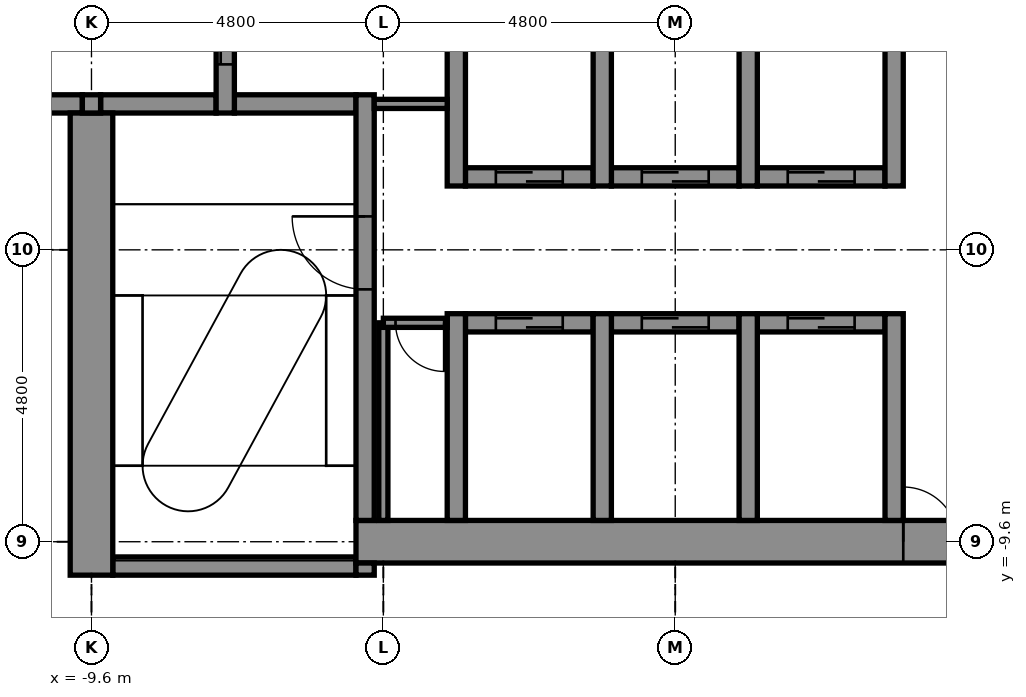
"""IFC4 building model, lengths in metres.
Left out: names, types, materials, properties, quantities, classifications, styles, units other than length and angle.
Written with IfcOpenShell. Run it as: python <this file> out.ifc"""

import sys

from ifc_helpers import new_model, si_unit, direction, frame, frame_2d, origin, place, context, subcontext, project, spatial, rectangle, extrude, element, fill, save


model = new_model("IFC4")
c1 = context("Model", 3, precision=1e-05, world=origin(), true_north=direction((0.0, 1.0)))
c2 = subcontext(c1, "Body", "Model", "MODEL_VIEW")
j1 = project(units=[si_unit("LENGTHUNIT", "METRE"), si_unit("PLANEANGLEUNIT", "RADIAN")], contexts=[c1])
p1 = place(None, origin())
s1 = spatial("IfcSite", under=j1, at=p1, CompositionType="ELEMENT")
p2 = place(p1, origin())
s2 = spatial("IfcBuilding", under=s1, at=p2, CompositionType="ELEMENT")
p3 = place(p2, frame((0.0, 0.0, 181.7)))
s3 = spatial("IfcBuildingStorey", under=s2, at=p3, CompositionType="ELEMENT", Elevation=181.7)
p4 = place(p3, frame((-9.25, -10.0, -0.15), z_axis=(0.0, 0.0, 1.0), x_axis=(1.0, 0.0, 0.0)))
e1 = element("IfcWall", 1, at=p4, inside=s3, PredefinedType="STANDARD", context=c2, shape_type="SweptSolid", body=[
    extrude(rectangle(XDim=4.0, YDim=0.3, at=frame_2d((2.0, 0.0))), origin(), (0.0, 0.0, 1.0), 3.9),
])
p5 = place(p3, frame((-5.25, -9.6, -0.15), z_axis=(0.0, 0.0, 1.0), x_axis=(1.0, 0.0, 0.0)))
e2 = element("IfcWall", 2, at=p5, inside=s3, PredefinedType="SHEAR", context=c2, shape_type="SweptSolid", body=[
    extrude(rectangle(XDim=10.2, YDim=0.7, at=frame_2d((5.1, 0.0))), origin(), (0.0, 0.0, 1.0), 3.9),
])
p6 = place(p5, frame((9.0, 0.0, 0.15)))
e3 = element("IfcOpeningElement", 3, at=p6, cuts=e2, PredefinedType="OPENING", context=c2, shape_type="SweptSolid", body=[
    extrude(rectangle(XDim=0.9, YDim=2.1, at=frame_2d((0.45, 1.05))), frame((0.0, 0.36, 0.0), z_axis=(0.0, -1.0, 0.0), x_axis=(1.0, 0.0, 0.0)), (0.0, 0.0, 1.0), 0.72),
])
p7 = place(p3, frame((-3.45, -6.0, -0.15), z_axis=(0.0, 0.0, 1.0), x_axis=(1.0, 0.0, 0.0)))
e4 = element("IfcWall", 4, at=p7, inside=s3, PredefinedType="STANDARD", context=c2, shape_type="SweptSolid", body=[
    extrude(rectangle(XDim=2.1, YDim=0.3, at=frame_2d((1.05, 0.0))), origin(), (0.0, 0.0, 1.0), 3.9),
])
p8 = place(p7, frame((0.5, 0.0, 0.15)))
e5 = element("IfcOpeningElement", 5, at=p8, cuts=e4, PredefinedType="OPENING", context=c2, shape_type="SweptSolid", body=[
    extrude(rectangle(XDim=1.1, YDim=2.1, at=frame_2d((0.55, 1.05))), frame((0.0, 0.16, 0.0), z_axis=(0.0, -1.0, 0.0), x_axis=(1.0, 0.0, 0.0)), (0.0, 0.0, 1.0), 0.32),
])
p9 = place(p3, frame((-1.05, -6.0, -0.15), z_axis=(0.0, 0.0, 1.0), x_axis=(1.0, 0.0, 0.0)))
e6 = element("IfcWall", 6, at=p9, inside=s3, PredefinedType="STANDARD", context=c2, shape_type="SweptSolid", body=[
    extrude(rectangle(XDim=2.1, YDim=0.3, at=frame_2d((1.05, 0.0))), origin(), (0.0, 0.0, 1.0), 3.9),
])
p10 = place(p9, frame((0.5, 0.0, 0.15)))
e7 = element("IfcOpeningElement", 7, at=p10, cuts=e6, PredefinedType="OPENING", context=c2, shape_type="SweptSolid", body=[
    extrude(rectangle(XDim=1.1, YDim=2.1, at=frame_2d((0.55, 1.05))), frame((0.0, 0.16, 0.0), z_axis=(0.0, -1.0, 0.0), x_axis=(1.0, 0.0, 0.0)), (0.0, 0.0, 1.0), 0.32),
])
p11 = place(p3, frame((1.35, -6.0, -0.15), z_axis=(0.0, 0.0, 1.0), x_axis=(1.0, 0.0, 0.0)))
e8 = element("IfcWall", 8, at=p11, inside=s3, PredefinedType="STANDARD", context=c2, shape_type="SweptSolid", body=[
    extrude(rectangle(XDim=2.1, YDim=0.3, at=frame_2d((1.05, 0.0))), origin(), (0.0, 0.0, 1.0), 3.9),
])
p12 = place(p11, frame((0.5, 0.0, 0.15)))
e9 = element("IfcOpeningElement", 9, at=p12, cuts=e8, PredefinedType="OPENING", context=c2, shape_type="SweptSolid", body=[
    extrude(rectangle(XDim=1.1, YDim=2.1, at=frame_2d((0.55, 1.05))), frame((0.0, 0.16, 0.0), z_axis=(0.0, -1.0, 0.0), x_axis=(1.0, 0.0, 0.0)), (0.0, 0.0, 1.0), 0.32),
])
p13 = place(p3, frame((-3.45, -3.6, -0.15), z_axis=(0.0, 0.0, 1.0), x_axis=(1.0, 0.0, 0.0)))
e10 = element("IfcWall", 10, at=p13, inside=s3, PredefinedType="STANDARD", context=c2, shape_type="SweptSolid", body=[
    extrude(rectangle(XDim=2.1, YDim=0.3, at=frame_2d((1.05, 0.0))), origin(), (0.0, 0.0, 1.0), 3.9),
])
p14 = place(p13, frame((0.5, 0.0, 0.15)))
e11 = element("IfcOpeningElement", 11, at=p14, cuts=e10, PredefinedType="OPENING", context=c2, shape_type="SweptSolid", body=[
    extrude(rectangle(XDim=1.1, YDim=2.1, at=frame_2d((0.55, 1.05))), frame((0.0, 0.16, 0.0), z_axis=(0.0, -1.0, 0.0), x_axis=(1.0, 0.0, 0.0)), (0.0, 0.0, 1.0), 0.32),
])
p15 = place(p3, frame((-1.05, -3.6, -0.15), z_axis=(0.0, 0.0, 1.0), x_axis=(1.0, 0.0, 0.0)))
e12 = element("IfcWall", 12, at=p15, inside=s3, PredefinedType="STANDARD", context=c2, shape_type="SweptSolid", body=[
    extrude(rectangle(XDim=2.1, YDim=0.3, at=frame_2d((1.05, 0.0))), origin(), (0.0, 0.0, 1.0), 3.9),
])
p16 = place(p15, frame((0.5, 0.0, 0.15)))
e13 = element("IfcOpeningElement", 13, at=p16, cuts=e12, PredefinedType="OPENING", context=c2, shape_type="SweptSolid", body=[
    extrude(rectangle(XDim=1.1, YDim=2.1, at=frame_2d((0.55, 1.05))), frame((0.0, 0.16, 0.0), z_axis=(0.0, -1.0, 0.0), x_axis=(1.0, 0.0, 0.0)), (0.0, 0.0, 1.0), 0.32),
])
p17 = place(p3, frame((1.35, -3.6, -0.15), z_axis=(0.0, 0.0, 1.0), x_axis=(1.0, 0.0, 0.0)))
e14 = element("IfcWall", 14, at=p17, inside=s3, PredefinedType="STANDARD", context=c2, shape_type="SweptSolid", body=[
    extrude(rectangle(XDim=2.1, YDim=0.3, at=frame_2d((1.05, 0.0))), origin(), (0.0, 0.0, 1.0), 3.9),
])
p18 = place(p17, frame((0.5, 0.0, 0.15)))
e15 = element("IfcOpeningElement", 15, at=p18, cuts=e14, PredefinedType="OPENING", context=c2, shape_type="SweptSolid", body=[
    extrude(rectangle(XDim=1.1, YDim=2.1, at=frame_2d((0.55, 1.05))), frame((0.0, 0.16, 0.0), z_axis=(0.0, -1.0, 0.0), x_axis=(1.0, 0.0, 0.0)), (0.0, 0.0, 1.0), 0.32),
])
p19 = place(p3, frame((-10.85, -2.4, -0.15), z_axis=(0.0, 0.0, 1.0), x_axis=(1.0, 0.0, 0.0)))
e16 = element("IfcWall", 16, at=p19, inside=s3, PredefinedType="STANDARD", context=c2, shape_type="SweptSolid", body=[
    extrude(rectangle(XDim=1.1, YDim=0.3, at=frame_2d((0.55, 0.0))), origin(), (0.0, 0.0, 1.0), 3.9),
])
p20 = place(p3, frame((-9.45, -2.4, -0.15), z_axis=(0.0, 0.0, 1.0), x_axis=(1.0, 0.0, 0.0)))
e17 = element("IfcWall", 17, at=p20, inside=s3, PredefinedType="STANDARD", context=c2, shape_type="SweptSolid", body=[
    extrude(rectangle(XDim=1.9, YDim=0.3, at=frame_2d((0.95, 0.0))), origin(), (0.0, 0.0, 1.0), 3.9),
])
p21 = place(p3, frame((-7.25, -2.4, -0.15), z_axis=(0.0, 0.0, 1.0), x_axis=(1.0, 0.0, 0.0)))
e18 = element("IfcWall", 18, at=p21, inside=s3, PredefinedType="STANDARD", context=c2, shape_type="SweptSolid", body=[
    extrude(rectangle(XDim=2.0, YDim=0.3, at=frame_2d((1.0, 0.0))), origin(), (0.0, 0.0, 1.0), 3.9),
])
p22 = place(p3, frame((-9.6, -10.15, -0.15), z_axis=(0.0, 0.0, 1.0), x_axis=(0.0, 1.0, 0.0)))
e19 = element("IfcWall", 19, at=p22, inside=s3, PredefinedType="SHEAR", context=c2, shape_type="SweptSolid", body=[
    extrude(rectangle(XDim=7.6, YDim=0.7, at=frame_2d((3.8, 0.0))), origin(), (0.0, 0.0, 1.0), 3.9),
])
p23 = place(p3, frame((-9.6, -2.55, -0.15), z_axis=(0.0, 0.0, 1.0), x_axis=(0.0, 1.0, 0.0)))
e20 = element("IfcWall", 20, at=p23, inside=s3, PredefinedType="STANDARD", context=c2, shape_type="SweptSolid", body=[
    extrude(rectangle(XDim=0.3, YDim=0.3, at=frame_2d((0.15, 0.0))), origin(), (0.0, 0.0, 1.0), 3.9),
])
p24 = place(p3, frame((-7.4, -2.55, -0.15), z_axis=(0.0, 0.0, 1.0), x_axis=(0.0, 1.0, 0.0)))
e21 = element("IfcWall", 21, at=p24, inside=s3, PredefinedType="STANDARD", context=c2, shape_type="SweptSolid", body=[
    extrude(rectangle(XDim=5.1, YDim=0.3, at=frame_2d((2.55, 0.0))), origin(), (0.0, 0.0, 1.0), 3.9),
])
p25 = place(p24, frame((0.8, 0.0, 0.15)))
e22 = element("IfcOpeningElement", 22, at=p25, cuts=e21, PredefinedType="OPENING", context=c2, shape_type="SweptSolid", body=[
    extrude(rectangle(XDim=1.1, YDim=2.1, at=frame_2d((0.55, 1.05))), frame((0.0, 0.16, 0.0), z_axis=(0.0, -1.0, 0.0), x_axis=(1.0, 0.0, 0.0)), (0.0, 0.0, 1.0), 0.32),
])
p26 = place(p24, frame((3.2, 0.0, 0.15)))
e23 = element("IfcOpeningElement", 23, at=p26, cuts=e21, PredefinedType="OPENING", context=c2, shape_type="SweptSolid", body=[
    extrude(rectangle(XDim=1.1, YDim=2.1, at=frame_2d((0.55, 1.05))), frame((0.0, 0.16, 0.0), z_axis=(0.0, -1.0, 0.0), x_axis=(1.0, 0.0, 0.0)), (0.0, 0.0, 1.0), 0.32),
])
p27 = place(p3, frame((-5.1, -10.15, -0.15), z_axis=(0.0, 0.0, 1.0), x_axis=(0.0, 1.0, 0.0)))
e24 = element("IfcWall", 24, at=p27, inside=s3, PredefinedType="STANDARD", context=c2, shape_type="SweptSolid", body=[
    extrude(rectangle(XDim=0.2, YDim=0.3, at=frame_2d((0.1, 0.0))), origin(), (0.0, 0.0, 1.0), 3.9),
])
p28 = place(p3, frame((-5.1, -9.25, -0.15), z_axis=(0.0, 0.0, 1.0), x_axis=(0.0, 1.0, 0.0)))
e25 = element("IfcWall", 25, at=p28, inside=s3, PredefinedType="STANDARD", context=c2, shape_type="SweptSolid", body=[
    extrude(rectangle(XDim=7.0, YDim=0.3, at=frame_2d((3.5, 0.0))), origin(), (0.0, 0.0, 1.0), 3.9),
])
p29 = place(p28, frame((3.8, 0.0, 0.15)))
e26 = element("IfcOpeningElement", 26, at=p29, cuts=e25, PredefinedType="OPENING", context=c2, shape_type="SweptSolid", body=[
    extrude(rectangle(XDim=1.2, YDim=2.1, at=frame_2d((0.6, 1.05))), frame((0.0, 0.16, 0.0), z_axis=(0.0, -1.0, 0.0), x_axis=(1.0, 0.0, 0.0)), (0.0, 0.0, 1.0), 0.32),
])
p30 = place(p3, frame((-3.6, -9.25, -0.15), z_axis=(0.0, 0.0, 1.0), x_axis=(0.0, 1.0, 0.0)))
e27 = element("IfcWall", 27, at=p30, inside=s3, PredefinedType="STANDARD", context=c2, shape_type="SweptSolid", body=[
    extrude(rectangle(XDim=3.4, YDim=0.3, at=frame_2d((1.7, 0.0))), origin(), (0.0, 0.0, 1.0), 3.9),
])
p31 = place(p3, frame((-3.6, -3.75, -0.15), z_axis=(0.0, 0.0, 1.0), x_axis=(0.0, 1.0, 0.0)))
e28 = element("IfcWall", 28, at=p31, inside=s3, PredefinedType="STANDARD", context=c2, shape_type="SweptSolid", body=[
    extrude(rectangle(XDim=7.5, YDim=0.3, at=frame_2d((3.75, 0.0))), origin(), (0.0, 0.0, 1.0), 3.9),
])
p32 = place(p3, frame((-1.2, -9.25, -0.15), z_axis=(0.0, 0.0, 1.0), x_axis=(0.0, 1.0, 0.0)))
e29 = element("IfcWall", 29, at=p32, inside=s3, PredefinedType="STANDARD", context=c2, shape_type="SweptSolid", body=[
    extrude(rectangle(XDim=3.4, YDim=0.3, at=frame_2d((1.7, 0.0))), origin(), (0.0, 0.0, 1.0), 3.9),
])
p33 = place(p3, frame((-1.2, -3.75, -0.15), z_axis=(0.0, 0.0, 1.0), x_axis=(0.0, 1.0, 0.0)))
e30 = element("IfcWall", 30, at=p33, inside=s3, PredefinedType="STANDARD", context=c2, shape_type="SweptSolid", body=[
    extrude(rectangle(XDim=7.5, YDim=0.3, at=frame_2d((3.75, 0.0))), origin(), (0.0, 0.0, 1.0), 3.9),
])
p34 = place(p3, frame((1.2, -9.25, -0.15), z_axis=(0.0, 0.0, 1.0), x_axis=(0.0, 1.0, 0.0)))
e31 = element("IfcWall", 31, at=p34, inside=s3, PredefinedType="STANDARD", context=c2, shape_type="SweptSolid", body=[
    extrude(rectangle(XDim=3.4, YDim=0.3, at=frame_2d((1.7, 0.0))), origin(), (0.0, 0.0, 1.0), 3.9),
])
p35 = place(p3, frame((1.2, -3.75, -0.15), z_axis=(0.0, 0.0, 1.0), x_axis=(0.0, 1.0, 0.0)))
e32 = element("IfcWall", 32, at=p35, inside=s3, PredefinedType="STANDARD", context=c2, shape_type="SweptSolid", body=[
    extrude(rectangle(XDim=7.5, YDim=0.3, at=frame_2d((3.75, 0.0))), origin(), (0.0, 0.0, 1.0), 3.9),
])
p36 = place(p3, frame((3.6, -9.25, -0.15), z_axis=(0.0, 0.0, 1.0), x_axis=(0.0, 1.0, 0.0)))
e33 = element("IfcWall", 33, at=p36, inside=s3, PredefinedType="STANDARD", context=c2, shape_type="SweptSolid", body=[
    extrude(rectangle(XDim=3.4, YDim=0.3, at=frame_2d((1.7, 0.0))), origin(), (0.0, 0.0, 1.0), 3.9),
])
p37 = place(p3, frame((3.6, -3.75, -0.15), z_axis=(0.0, 0.0, 1.0), x_axis=(0.0, 1.0, 0.0)))
e34 = element("IfcWall", 34, at=p37, inside=s3, PredefinedType="STANDARD", context=c2, shape_type="SweptSolid", body=[
    extrude(rectangle(XDim=7.5, YDim=0.3, at=frame_2d((3.75, 0.0))), origin(), (0.0, 0.0, 1.0), 3.9),
])
p38 = place(p3, frame((-4.8, -9.25, 0.0), z_axis=(0.0, 0.0, 1.0), x_axis=(0.0, 1.0, 0.0)))
e35 = element("IfcWall", 35, at=p38, inside=s3, PredefinedType="PARTITIONING", context=c2, shape_type="SweptSolid", body=[
    extrude(rectangle(XDim=3.25, YDim=0.15, at=frame_2d((1.625, 0.0))), origin(), (0.0, 0.0, 1.0), 3.75),
])
p39 = place(p3, frame((-4.8, -6.0, 0.0), z_axis=(0.0, 0.0, 1.0), x_axis=(1.0, 0.0, 0.0)))
e36 = element("IfcWall", 36, at=p39, inside=s3, PredefinedType="PARTITIONING", context=c2, shape_type="SweptSolid", body=[
    extrude(rectangle(XDim=1.05, YDim=0.15, at=frame_2d((0.525, 0.0))), origin(), (0.0, 0.0, 1.0), 3.75),
])
p40 = place(p39, frame((0.2, 0.0, 0.0)))
e37 = element("IfcOpeningElement", 37, at=p40, cuts=e36, PredefinedType="OPENING", context=c2, shape_type="SweptSolid", body=[
    extrude(rectangle(XDim=0.8, YDim=2.1, at=frame_2d((0.4, 1.05))), frame((0.0, 0.085, 0.0), z_axis=(0.0, -1.0, 0.0), x_axis=(1.0, 0.0, 0.0)), (0.0, 0.0, 1.0), 0.17),
])
p41 = place(p3, frame((-4.95, -2.4, 0.0), z_axis=(0.0, 0.0, 1.0), x_axis=(1.0, 0.0, 0.0)))
e38 = element("IfcWall", 38, at=p41, inside=s3, PredefinedType="PARTITIONING", context=c2, shape_type="SweptSolid", body=[
    extrude(rectangle(XDim=1.2, YDim=0.15, at=frame_2d((0.6, 0.0))), origin(), (0.0, 0.0, 1.0), 3.75),
])
p42 = place(p40, frame((0.8, 0.0, 0.0), z_axis=(0.0, 0.0, 1.0), x_axis=(-1.0, 0.0, 0.0)))
e39 = element("IfcDoor", 39, at=p42, inside=s3, OperationType="SINGLE_SWING_RIGHT", PredefinedType="DOOR", context=c2, shape_type="SweptSolid", body=[
    extrude(rectangle(XDim=0.8, YDim=2.1, at=frame_2d((0.4, 1.05))), frame((0.0, 0.025, 0.0), z_axis=(0.0, -1.0, 0.0), x_axis=(1.0, 0.0, 0.0)), (0.0, 0.0, 1.0), 0.05),
])
fill(e37, e39)
p43 = place(p25, origin())
e40 = element("IfcDoor", 40, at=p43, inside=s3, OperationType="DOUBLE_DOOR_SLIDING", PredefinedType="DOOR", context=c2, shape_type="SweptSolid", body=[
    extrude(rectangle(XDim=1.1, YDim=2.1, at=frame_2d((0.55, 1.05))), frame((0.0, 0.025, 0.0), z_axis=(0.0, -1.0, 0.0), x_axis=(1.0, 0.0, 0.0)), (0.0, 0.0, 1.0), 0.05),
])
fill(e22, e40)
p44 = place(p14, origin())
e41 = element("IfcDoor", 41, at=p44, inside=s3, OperationType="DOUBLE_DOOR_SLIDING", PredefinedType="DOOR", context=c2, shape_type="SweptSolid", body=[
    extrude(rectangle(XDim=1.1, YDim=2.1, at=frame_2d((0.55, 1.05))), frame((0.0, 0.025, 0.0), z_axis=(0.0, -1.0, 0.0), x_axis=(1.0, 0.0, 0.0)), (0.0, 0.0, 1.0), 0.05),
])
fill(e11, e41)
p45 = place(p16, origin())
e42 = element("IfcDoor", 42, at=p45, inside=s3, OperationType="DOUBLE_DOOR_SLIDING", PredefinedType="DOOR", context=c2, shape_type="SweptSolid", body=[
    extrude(rectangle(XDim=1.1, YDim=2.1, at=frame_2d((0.55, 1.05))), frame((0.0, 0.025, 0.0), z_axis=(0.0, -1.0, 0.0), x_axis=(1.0, 0.0, 0.0)), (0.0, 0.0, 1.0), 0.05),
])
fill(e13, e42)
p46 = place(p18, origin())
e43 = element("IfcDoor", 43, at=p46, inside=s3, OperationType="DOUBLE_DOOR_SLIDING", PredefinedType="DOOR", context=c2, shape_type="SweptSolid", body=[
    extrude(rectangle(XDim=1.1, YDim=2.1, at=frame_2d((0.55, 1.05))), frame((0.0, 0.025, 0.0), z_axis=(0.0, -1.0, 0.0), x_axis=(1.0, 0.0, 0.0)), (0.0, 0.0, 1.0), 0.05),
])
fill(e15, e43)
p47 = place(p8, origin())
e44 = element("IfcDoor", 44, at=p47, inside=s3, OperationType="DOUBLE_DOOR_SLIDING", PredefinedType="DOOR", context=c2, shape_type="SweptSolid", body=[
    extrude(rectangle(XDim=1.1, YDim=2.1, at=frame_2d((0.55, 1.05))), frame((0.0, 0.025, 0.0), z_axis=(0.0, -1.0, 0.0), x_axis=(1.0, 0.0, 0.0)), (0.0, 0.0, 1.0), 0.05),
])
fill(e5, e44)
p48 = place(p10, origin())
e45 = element("IfcDoor", 45, at=p48, inside=s3, OperationType="DOUBLE_DOOR_SLIDING", PredefinedType="DOOR", context=c2, shape_type="SweptSolid", body=[
    extrude(rectangle(XDim=1.1, YDim=2.1, at=frame_2d((0.55, 1.05))), frame((0.0, 0.025, 0.0), z_axis=(0.0, -1.0, 0.0), x_axis=(1.0, 0.0, 0.0)), (0.0, 0.0, 1.0), 0.05),
])
fill(e7, e45)
p49 = place(p12, origin())
e46 = element("IfcDoor", 46, at=p49, inside=s3, OperationType="DOUBLE_DOOR_SLIDING", PredefinedType="DOOR", context=c2, shape_type="SweptSolid", body=[
    extrude(rectangle(XDim=1.1, YDim=2.1, at=frame_2d((0.55, 1.05))), frame((0.0, 0.025, 0.0), z_axis=(0.0, -1.0, 0.0), x_axis=(1.0, 0.0, 0.0)), (0.0, 0.0, 1.0), 0.05),
])
fill(e9, e46)
p50 = place(p29, origin())
e47 = element("IfcDoor", 47, at=p50, inside=s3, OperationType="SINGLE_SWING_RIGHT", PredefinedType="DOOR", context=c2, shape_type="SweptSolid", body=[
    extrude(rectangle(XDim=1.2, YDim=2.1, at=frame_2d((0.6, 1.05))), frame((0.0, 0.025, 0.0), z_axis=(0.0, -1.0, 0.0), x_axis=(1.0, 0.0, 0.0)), (0.0, 0.0, 1.0), 0.05),
])
fill(e26, e47)
p51 = place(p6, origin())
e48 = element("IfcDoor", 48, at=p51, inside=s3, OperationType="SINGLE_SWING_LEFT", PredefinedType="DOOR", context=c2, shape_type="SweptSolid", body=[
    extrude(rectangle(XDim=0.9, YDim=2.1, at=frame_2d((0.45, 1.05))), frame((0.0, 0.025, 0.0), z_axis=(0.0, -1.0, 0.0), x_axis=(1.0, 0.0, 0.0)), (0.0, 0.0, 1.0), 0.05),
])
fill(e3, e48)
save(model, sys.argv[1])
